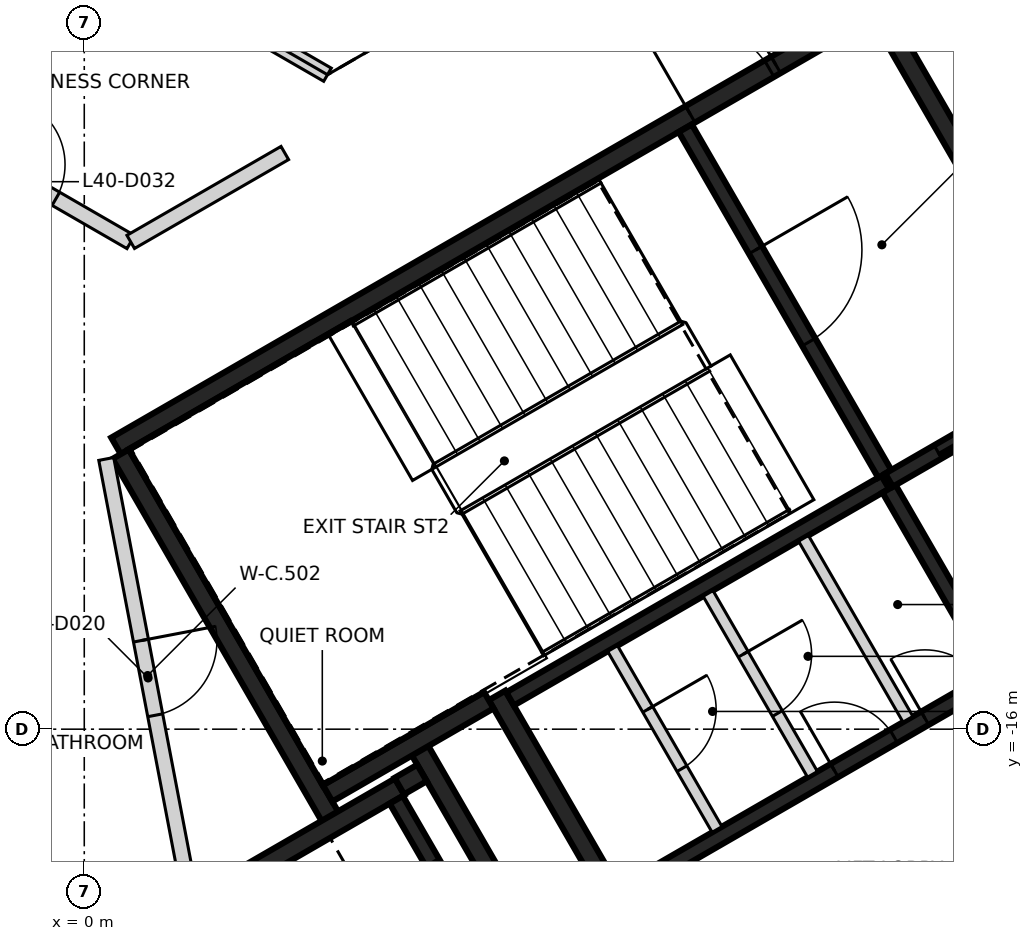
"""IFC4 building model, lengths in metres.
Left out: names, types, materials, properties, quantities, classifications, styles, units other than length and angle.
Written with IfcOpenShell. Run it as: python <this file> out.ifc"""

import sys

from ifc_helpers import new_model, si_unit, direction, frame, frame_2d, origin, place, context, subcontext, project, spatial, rectangle, extrude, element, fill, save


model = new_model("IFC4")
c1 = context("Model", 3, precision=1e-05, world=origin(), true_north=direction((0.0, 1.0)))
c2 = subcontext(c1, "Body", "Model", "MODEL_VIEW")
j1 = project(units=[si_unit("LENGTHUNIT", "METRE"), si_unit("PLANEANGLEUNIT", "RADIAN")], contexts=[c1])
p1 = place(None, origin())
s1 = spatial("IfcSite", under=j1, at=p1, CompositionType="ELEMENT")
p2 = place(p1, origin())
s2 = spatial("IfcBuilding", under=s1, at=p2, CompositionType="ELEMENT")
p3 = place(p2, frame((0.0, 0.0, 161.2)))
s3 = spatial("IfcBuildingStorey", under=s2, at=p3, CompositionType="ELEMENT", Elevation=161.2)
p4 = place(p3, frame((0.417, -12.273, 0.0), z_axis=(0.0, 0.0, 1.0), x_axis=(0.866021906294, 0.500006057782, 0.0)))
e1 = element("IfcWall", 1, at=p4, inside=s3, PredefinedType="SHEAR", context=c2, shape_type="SweptSolid", body=[
    extrude(rectangle(XDim=11.55, YDim=0.25, at=frame_2d((5.775, 0.0))), origin(), (0.0, 0.0, 1.0), 3.2),
])
p5 = place(p4, frame((10.025, 0.0, 0.0)))
e2 = element("IfcOpeningElement", 2, at=p5, cuts=e1, PredefinedType="OPENING", context=c2, shape_type="SweptSolid", body=[
    extrude(rectangle(XDim=1.2, YDim=2.1, at=frame_2d((0.6, 1.05))), frame((0.0, 0.135, 0.0), z_axis=(0.0, -1.0, 0.0), x_axis=(1.0, 0.0, 0.0)), (0.0, 0.0, 1.0), 0.27),
])
p6 = place(p4, frame((8.725, 0.0, 0.0)))
e3 = element("IfcOpeningElement", 3, at=p6, cuts=e1, PredefinedType="OPENING", context=c2, shape_type="SweptSolid", body=[
    extrude(rectangle(XDim=1.2, YDim=2.1, at=frame_2d((0.6, 1.05))), frame((0.0, 0.135, 0.0), z_axis=(0.0, -1.0, 0.0), x_axis=(1.0, 0.0, 0.0)), (0.0, 0.0, 1.0), 0.27),
])
p7 = place(p3, frame((3.235, -17.153, 0.0), z_axis=(0.0, 0.0, 1.0), x_axis=(-0.500008851346, 0.866020293397, 0.0)))
e4 = element("IfcWall", 4, at=p7, inside=s3, PredefinedType="SHEAR", context=c2, shape_type="SweptSolid", body=[
    extrude(rectangle(XDim=5.51, YDim=0.25, at=frame_2d((2.755, 0.0))), origin(), (0.0, 0.0, 1.0), 3.2),
])
p8 = place(p3, frame((10.483, -6.606, 0.0), z_axis=(0.0, 0.0, 1.0), x_axis=(0.49999885962, -0.866026062182, 0.0)))
e5 = element("IfcWall", 5, at=p8, inside=s3, PredefinedType="SHEAR", context=c2, shape_type="SweptSolid", body=[
    extrude(rectangle(XDim=5.225, YDim=0.25, at=frame_2d((2.612, 0.0))), origin(), (0.0, 0.0, 1.0), 3.2),
])
p9 = place(p3, frame((7.031, -18.327, 0.0), z_axis=(0.0, 0.0, 1.0), x_axis=(-0.499971222258, 0.866042017984, 0.0)))
e6 = element("IfcWall", 6, at=p9, inside=s3, PredefinedType="SHEAR", context=c2, shape_type="SweptSolid", body=[
    extrude(rectangle(XDim=3.2, YDim=0.25, at=frame_2d((1.6, 0.0))), origin(), (0.0, 0.0, 1.0), 3.2),
])
p10 = place(p3, frame((1.669, -18.19, 0.0), z_axis=(0.0, 0.0, 1.0), x_axis=(0.866042235819, 0.499970844928, 0.0)))
e7 = element("IfcWall", 7, at=p10, inside=s3, PredefinedType="SHEAR", context=c2, shape_type="SweptSolid", body=[
    extrude(rectangle(XDim=2.865, YDim=0.25, at=frame_2d((1.432, 0.0))), origin(), (0.0, 0.0, 1.0), 3.2),
])
p11 = place(p3, frame((4.414, -16.276, 0.0), z_axis=(0.0, 0.0, 1.0), x_axis=(0.500003324108, -0.866023484601, 0.0)))
e8 = element("IfcWall", 8, at=p11, inside=s3, PredefinedType="SHEAR", context=c2, shape_type="SweptSolid", body=[
    extrude(rectangle(XDim=3.085, YDim=0.25, at=frame_2d((1.542, 0.0))), origin(), (0.0, 0.0, 1.0), 3.2),
])
p12 = place(p3, frame((5.322, -15.619, 0.0), z_axis=(0.0, 0.0, 1.0), x_axis=(-0.866026229868, -0.499998569178, 0.0)))
e9 = element("IfcWall", 9, at=p12, inside=s3, PredefinedType="SHEAR", context=c2, shape_type="SweptSolid", body=[
    extrude(rectangle(XDim=2.449, YDim=0.25, at=frame_2d((1.225, 0.0))), origin(), (0.0, 0.0, 1.0), 3.2),
])
p13 = place(p3, frame((4.145, -16.749, 0.0), z_axis=(0.0, 0.0, 1.0), x_axis=(0.866185586049, 0.49972245349, 0.0)))
e10 = element("IfcWall", 10, at=p13, inside=s3, PredefinedType="SHEAR", context=c2, shape_type="SweptSolid", body=[
    extrude(rectangle(XDim=0.344, YDim=0.25, at=frame_2d((0.172, 0.0))), origin(), (0.0, 0.0, 1.0), 3.2),
])
p14 = place(p3, frame((9.052, -20.48, 0.0), z_axis=(0.0, 0.0, 1.0), x_axis=(0.866030299012, 0.499991521122, 0.0)))
e11 = element("IfcWall", 11, at=p14, inside=s3, PredefinedType="SHEAR", context=c2, shape_type="SweptSolid", body=[
    extrude(rectangle(XDim=6.1, YDim=0.2, at=frame_2d((3.05, 0.0))), origin(), (0.0, 0.0, 1.0), 3.2),
])
p15 = place(p14, frame((1.0, 0.0, 0.0)))
e12 = element("IfcOpeningElement", 12, at=p15, cuts=e11, PredefinedType="OPENING", context=c2, shape_type="SweptSolid", body=[
    extrude(rectangle(XDim=1.2, YDim=2.1, at=frame_2d((0.6, 1.05))), frame((0.0, 0.11, 0.0), z_axis=(0.0, -1.0, 0.0), x_axis=(1.0, 0.0, 0.0)), (0.0, 0.0, 1.0), 0.22),
])
p16 = place(p14, frame((4.05, 0.0, 0.0)))
e13 = element("IfcOpeningElement", 13, at=p16, cuts=e11, PredefinedType="OPENING", context=c2, shape_type="SweptSolid", body=[
    extrude(rectangle(XDim=1.2, YDim=2.1, at=frame_2d((0.6, 1.05))), frame((0.0, 0.11, 0.0), z_axis=(0.0, -1.0, 0.0), x_axis=(1.0, 0.0, 0.0)), (0.0, 0.0, 1.0), 0.22),
])
p17 = place(p3, frame((10.538, -12.752, 0.0), z_axis=(0.0, 0.0, 1.0), x_axis=(-0.866038630372, -0.499977090179, 0.0)))
e14 = element("IfcWall", 14, at=p17, inside=s3, PredefinedType="SHEAR", context=c2, shape_type="SweptSolid", body=[
    extrude(rectangle(XDim=5.699, YDim=0.2, at=frame_2d((2.85, 0.0))), origin(), (0.0, 0.0, 1.0), 3.2),
])
p18 = place(p3, frame((7.077, -18.156, 0.0), z_axis=(0.0, 0.0, 1.0), x_axis=(0.866038630372, 0.499977090179, 0.0)))
e15 = element("IfcWall", 15, at=p18, inside=s3, PredefinedType="SHEAR", context=c2, shape_type="SweptSolid", body=[
    extrude(rectangle(XDim=5.699, YDim=0.2, at=frame_2d((2.85, 0.0))), origin(), (0.0, 0.0, 1.0), 3.2),
])
p19 = place(p18, frame((3.224, 0.0, 0.0)))
e16 = element("IfcOpeningElement", 16, at=p19, cuts=e15, PredefinedType="OPENING", context=c2, shape_type="SweptSolid", body=[
    extrude(rectangle(XDim=0.9, YDim=2.1, at=frame_2d((0.45, 1.05))), frame((0.0, 0.11, 0.0), z_axis=(0.0, -1.0, 0.0), x_axis=(1.0, 0.0, 0.0)), (0.0, 0.0, 1.0), 0.22),
])
p20 = place(p18, frame((4.599, 0.0, 0.0)))
e17 = element("IfcOpeningElement", 17, at=p20, cuts=e15, PredefinedType="OPENING", context=c2, shape_type="SweptSolid", body=[
    extrude(rectangle(XDim=0.9, YDim=2.1, at=frame_2d((0.45, 1.05))), frame((0.0, 0.11, 0.0), z_axis=(0.0, -1.0, 0.0), x_axis=(1.0, 0.0, 0.0)), (0.0, 0.0, 1.0), 0.22),
])
p21 = place(p3, frame((7.906, -8.094, 0.0), z_axis=(0.0, 0.0, 1.0), x_axis=(0.500024287448, -0.866011380966, 0.0)))
e18 = element("IfcWall", 18, at=p21, inside=s3, PredefinedType="SHEAR", context=c2, shape_type="SweptSolid", body=[
    extrude(rectangle(XDim=5.251, YDim=0.2, at=frame_2d((2.625, 0.0))), origin(), (0.0, 0.0, 1.0), 3.2),
])
p22 = place(p21, frame((1.849, 0.0, 0.0)))
e19 = element("IfcOpeningElement", 19, at=p22, cuts=e18, PredefinedType="OPENING", context=c2, shape_type="SweptSolid", body=[
    extrude(rectangle(XDim=1.4, YDim=2.1, at=frame_2d((0.7, 1.05))), frame((0.0, 0.11, 0.0), z_axis=(0.0, -1.0, 0.0), x_axis=(1.0, 0.0, 0.0)), (0.0, 0.0, 1.0), 0.22),
])
p23 = place(p3, frame((5.503, -19.352, 0.0), z_axis=(0.0, 0.0, 1.0), x_axis=(-0.499986818241, 0.866033014143, 0.0)))
e20 = element("IfcWall", 20, at=p23, inside=s3, PredefinedType="SHEAR", context=c2, shape_type="SweptSolid", body=[
    extrude(rectangle(XDim=2.798, YDim=0.2, at=frame_2d((1.399, 0.0))), origin(), (0.0, 0.0, 1.0), 3.2),
])
p24 = place(p23, frame((0.949, 0.0, 0.0)))
e21 = element("IfcOpeningElement", 21, at=p24, cuts=e20, PredefinedType="OPENING", context=c2, shape_type="SweptSolid", body=[
    extrude(rectangle(XDim=0.9, YDim=2.1, at=frame_2d((0.45, 1.05))), frame((0.0, 0.11, 0.0), z_axis=(0.0, -1.0, 0.0), x_axis=(1.0, 0.0, 0.0)), (0.0, 0.0, 1.0), 0.22),
])
p25 = place(p3, frame((11.963, -15.22, 0.0), z_axis=(0.0, 0.0, 1.0), x_axis=(-0.500034990121, 0.866005201286, 0.0)))
e22 = element("IfcWall", 22, at=p25, inside=s3, PredefinedType="SHEAR", context=c2, shape_type="SweptSolid", body=[
    extrude(rectangle(XDim=2.75, YDim=0.2, at=frame_2d((1.375, 0.0))), origin(), (0.0, 0.0, 1.0), 3.2),
])
p26 = place(p3, frame((10.587, -12.723, 0.0), z_axis=(0.0, 0.0, 1.0), x_axis=(0.866037306777, 0.499979382845, 0.0)))
e23 = element("IfcWall", 23, at=p26, inside=s3, PredefinedType="SHEAR", context=c2, shape_type="SweptSolid", body=[
    extrude(rectangle(XDim=2.742, YDim=0.2, at=frame_2d((1.371, 0.0))), origin(), (0.0, 0.0, 1.0), 3.2),
])
p27 = place(p26, frame((0.743, 0.0, 0.0)))
e24 = element("IfcOpeningElement", 24, at=p27, cuts=e23, PredefinedType="OPENING", context=c2, shape_type="SweptSolid", body=[
    extrude(rectangle(XDim=1.3, YDim=2.1, at=frame_2d((0.65, 1.05))), frame((0.0, 0.11, 0.0), z_axis=(0.0, -1.0, 0.0), x_axis=(1.0, 0.0, 0.0)), (0.0, 0.0, 1.0), 0.22),
])
p28 = place(p3, frame((8.207, -14.214, 0.0), z_axis=(0.0, 0.0, 1.0), x_axis=(0.50002746344, -0.86600954718, 0.0)))
e25 = element("IfcWall", 25, at=p28, inside=s3, PredefinedType="PARTITIONING", context=c2, shape_type="SweptSolid", body=[
    extrude(rectangle(XDim=2.748, YDim=0.15, at=frame_2d((1.374, 0.0))), origin(), (0.0, 0.0, 1.0), 3.2),
])
p29 = place(p28, frame((0.924, 0.0, 0.0)))
e26 = element("IfcOpeningElement", 26, at=p29, cuts=e25, PredefinedType="OPENING", context=c2, shape_type="SweptSolid", body=[
    extrude(rectangle(XDim=0.9, YDim=2.1, at=frame_2d((0.45, 1.05))), frame((0.0, 0.085, 0.0), z_axis=(0.0, -1.0, 0.0), x_axis=(1.0, 0.0, 0.0)), (0.0, 0.0, 1.0), 0.17),
])
p30 = place(p3, frame((9.462, -13.489, 0.0), z_axis=(0.0, 0.0, 1.0), x_axis=(0.499988999718, -0.866031754707, 0.0)))
e27 = element("IfcWall", 27, at=p30, inside=s3, PredefinedType="PARTITIONING", context=c2, shape_type="SweptSolid", body=[
    extrude(rectangle(XDim=2.749, YDim=0.15, at=frame_2d((1.374, 0.0))), origin(), (0.0, 0.0, 1.0), 3.2),
])
p31 = place(p3, frame((6.951, -14.939, 0.0), z_axis=(0.0, 0.0, 1.0), x_axis=(0.499988999718, -0.866031754707, 0.0)))
e28 = element("IfcWall", 28, at=p31, inside=s3, PredefinedType="PARTITIONING", context=c2, shape_type="SweptSolid", body=[
    extrude(rectangle(XDim=2.749, YDim=0.15, at=frame_2d((1.374, 0.0))), origin(), (0.0, 0.0, 1.0), 3.2),
])
p32 = place(p31, frame((0.924, 0.0, 0.0)))
e29 = element("IfcOpeningElement", 29, at=p32, cuts=e28, PredefinedType="OPENING", context=c2, shape_type="SweptSolid", body=[
    extrude(rectangle(XDim=0.9, YDim=2.1, at=frame_2d((0.45, 1.05))), frame((0.0, 0.085, 0.0), z_axis=(0.0, -1.0, 0.0), x_axis=(1.0, 0.0, 0.0)), (0.0, 0.0, 1.0), 0.17),
])
p33 = place(p3, frame((-8.612, -4.265, 0.0), z_axis=(0.0, 0.0, 1.0), x_axis=(0.865984415152, -0.500070987675, 0.0)))
e30 = element("IfcWall", 30, at=p33, inside=s3, PredefinedType="PARTITIONING", context=c2, shape_type="SweptSolid", body=[
    extrude(rectangle(XDim=10.651, YDim=0.2, at=frame_2d((5.326, 0.0))), origin(), (0.0, 0.0, 1.0), 3.2),
])
p34 = place(p33, frame((1.138, 0.0, 0.0)))
e31 = element("IfcOpeningElement", 31, at=p34, cuts=e30, PredefinedType="OPENING", context=c2, shape_type="SweptSolid", body=[
    extrude(rectangle(XDim=0.9, YDim=2.1, at=frame_2d((0.45, 1.05))), frame((0.0, 0.11, 0.0), z_axis=(0.0, -1.0, 0.0), x_axis=(1.0, 0.0, 0.0)), (0.0, 0.0, 1.0), 0.22),
])
p35 = place(p33, frame((4.876, 0.0, 0.0)))
e32 = element("IfcOpeningElement", 32, at=p35, cuts=e30, PredefinedType="OPENING", context=c2, shape_type="SweptSolid", body=[
    extrude(rectangle(XDim=0.9, YDim=2.1, at=frame_2d((0.45, 1.05))), frame((0.0, 0.11, 0.0), z_axis=(0.0, -1.0, 0.0), x_axis=(1.0, 0.0, 0.0)), (0.0, 0.0, 1.0), 0.22),
])
p36 = place(p33, frame((8.613, 0.0, 0.0)))
e33 = element("IfcOpeningElement", 33, at=p36, cuts=e30, PredefinedType="OPENING", context=c2, shape_type="SweptSolid", body=[
    extrude(rectangle(XDim=0.9, YDim=2.1, at=frame_2d((0.45, 1.05))), frame((0.0, 0.11, 0.0), z_axis=(0.0, -1.0, 0.0), x_axis=(1.0, 0.0, 0.0)), (0.0, 0.0, 1.0), 0.22),
])
p37 = place(p3, frame((0.289, -12.445, 0.0), z_axis=(0.0, 0.0, 1.0), x_axis=(0.187668946952, -0.982232338273, 0.0)))
e34 = element("IfcWall", 34, at=p37, inside=s3, PredefinedType="PARTITIONING", context=c2, shape_type="SweptSolid", body=[
    extrude(rectangle(XDim=5.802, YDim=0.2, at=frame_2d((2.901, 0.0))), origin(), (0.0, 0.0, 1.0), 3.2),
])
p38 = place(p37, frame((2.433, 0.0, 0.0)))
e35 = element("IfcOpeningElement", 35, at=p38, cuts=e34, PredefinedType="OPENING", context=c2, shape_type="SweptSolid", body=[
    extrude(rectangle(XDim=1.0, YDim=2.1, at=frame_2d((0.5, 1.05))), frame((0.0, 0.11, 0.0), z_axis=(0.0, -1.0, 0.0), x_axis=(1.0, 0.0, 0.0)), (0.0, 0.0, 1.0), 0.22),
])
p39 = place(p3, frame((0.611, -9.589, 0.0), z_axis=(0.0, 0.0, 1.0), x_axis=(0.866220316572, 0.499662249082, 0.0)))
e36 = element("IfcWall", 36, at=p39, inside=s3, PredefinedType="PARTITIONING", context=c2, shape_type="SweptSolid", body=[
    extrude(rectangle(XDim=2.34, YDim=0.2, at=frame_2d((1.17, 0.0))), origin(), (0.0, 0.0, 1.0), 3.2),
])
p40 = place(p3, frame((-8.0, -0.924, 0.0), z_axis=(0.0, 0.0, 1.0), x_axis=(0.86604129137, -0.499972480886, 0.0)))
e37 = element("IfcWall", 37, at=p40, inside=s3, PredefinedType="PARTITIONING", context=c2, shape_type="SweptSolid", body=[
    extrude(rectangle(XDim=12.932, YDim=0.2, at=frame_2d((6.466, 0.0))), origin(), (0.0, 0.0, 1.0), 2.3),
])
p41 = place(p27, origin())
e38 = element("IfcDoor", 38, at=p41, inside=s3, OperationType="SLIDING_TO_RIGHT", PredefinedType="DOOR", context=c2, shape_type="SweptSolid", body=[
    extrude(rectangle(XDim=1.3, YDim=2.1, at=frame_2d((0.65, 1.05))), frame((0.0, 0.025, 0.0), z_axis=(0.0, -1.0, 0.0), x_axis=(1.0, 0.0, 0.0)), (0.0, 0.0, 1.0), 0.05),
])
fill(e24, e38)
p42 = place(p5, origin())
e39 = element("IfcDoor", 39, at=p42, inside=s3, OperationType="SINGLE_SWING_LEFT", PredefinedType="DOOR", context=c2, shape_type="SweptSolid", body=[
    extrude(rectangle(XDim=1.2, YDim=2.1, at=frame_2d((0.6, 1.05))), frame((0.0, 0.025, 0.0), z_axis=(0.0, -1.0, 0.0), x_axis=(1.0, 0.0, 0.0)), (0.0, 0.0, 1.0), 0.05),
])
fill(e2, e39)
p43 = place(p6, origin())
e40 = element("IfcDoor", 40, at=p43, inside=s3, OperationType="SINGLE_SWING_RIGHT", PredefinedType="DOOR", context=c2, shape_type="SweptSolid", body=[
    extrude(rectangle(XDim=1.2, YDim=2.1, at=frame_2d((0.6, 1.05))), frame((0.0, 0.025, 0.0), z_axis=(0.0, -1.0, 0.0), x_axis=(1.0, 0.0, 0.0)), (0.0, 0.0, 1.0), 0.05),
])
fill(e3, e40)
p44 = place(p22, origin())
e41 = element("IfcDoor", 41, at=p44, inside=s3, OperationType="SINGLE_SWING_RIGHT", PredefinedType="DOOR", context=c2, shape_type="SweptSolid", body=[
    extrude(rectangle(XDim=1.4, YDim=2.1, at=frame_2d((0.7, 1.05))), frame((0.0, 0.025, 0.0), z_axis=(0.0, -1.0, 0.0), x_axis=(1.0, 0.0, 0.0)), (0.0, 0.0, 1.0), 0.05),
])
fill(e19, e41)
p45 = place(p19, origin())
e42 = element("IfcDoor", 42, at=p45, inside=s3, OperationType="SINGLE_SWING_LEFT", PredefinedType="DOOR", context=c2, shape_type="SweptSolid", body=[
    extrude(rectangle(XDim=0.9, YDim=2.1, at=frame_2d((0.45, 1.05))), frame((0.0, 0.025, 0.0), z_axis=(0.0, -1.0, 0.0), x_axis=(1.0, 0.0, 0.0)), (0.0, 0.0, 1.0), 0.05),
])
fill(e16, e42)
p46 = place(p20, origin())
e43 = element("IfcDoor", 43, at=p46, inside=s3, OperationType="SINGLE_SWING_RIGHT", PredefinedType="DOOR", context=c2, shape_type="SweptSolid", body=[
    extrude(rectangle(XDim=0.9, YDim=2.1, at=frame_2d((0.45, 1.05))), frame((0.0, 0.025, 0.0), z_axis=(0.0, -1.0, 0.0), x_axis=(1.0, 0.0, 0.0)), (0.0, 0.0, 1.0), 0.05),
])
fill(e17, e43)
p47 = place(p29, origin())
e44 = element("IfcDoor", 44, at=p47, inside=s3, OperationType="SINGLE_SWING_RIGHT", PredefinedType="DOOR", context=c2, shape_type="SweptSolid", body=[
    extrude(rectangle(XDim=0.9, YDim=2.1, at=frame_2d((0.45, 1.05))), frame((0.0, 0.025, 0.0), z_axis=(0.0, -1.0, 0.0), x_axis=(1.0, 0.0, 0.0)), (0.0, 0.0, 1.0), 0.05),
])
fill(e26, e44)
p48 = place(p32, origin())
e45 = element("IfcDoor", 45, at=p48, inside=s3, OperationType="SINGLE_SWING_LEFT", PredefinedType="DOOR", context=c2, shape_type="SweptSolid", body=[
    extrude(rectangle(XDim=0.9, YDim=2.1, at=frame_2d((0.45, 1.05))), frame((0.0, 0.025, 0.0), z_axis=(0.0, -1.0, 0.0), x_axis=(1.0, 0.0, 0.0)), (0.0, 0.0, 1.0), 0.05),
])
fill(e29, e45)
p49 = place(p38, origin())
e46 = element("IfcDoor", 46, at=p49, inside=s3, OperationType="SINGLE_SWING_LEFT", PredefinedType="DOOR", context=c2, shape_type="SweptSolid", body=[
    extrude(rectangle(XDim=1.0, YDim=2.1, at=frame_2d((0.5, 1.05))), frame((0.0, 0.025, 0.0), z_axis=(0.0, -1.0, 0.0), x_axis=(1.0, 0.0, 0.0)), (0.0, 0.0, 1.0), 0.05),
])
fill(e35, e46)
p50 = place(p36, origin())
e47 = element("IfcDoor", 47, at=p50, inside=s3, OperationType="SINGLE_SWING_LEFT", PredefinedType="DOOR", context=c2, shape_type="SweptSolid", body=[
    extrude(rectangle(XDim=0.9, YDim=2.1, at=frame_2d((0.45, 1.05))), frame((0.0, 0.025, 0.0), z_axis=(0.0, -1.0, 0.0), x_axis=(1.0, 0.0, 0.0)), (0.0, 0.0, 1.0), 0.05),
])
fill(e33, e47)
save(model, sys.argv[1])
